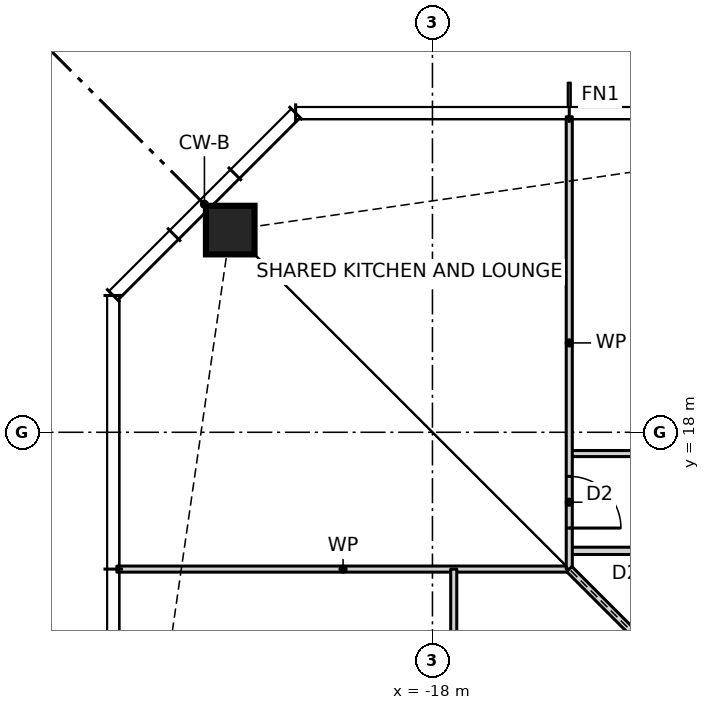
"""IFC4 building model, lengths in metres.
Left out: names, types, materials, properties, quantities, classifications, styles, units other than length and angle.
Written with IfcOpenShell. Run it as: python <this file> out.ifc"""

import sys

from ifc_helpers import new_model, si_unit, direction, frame, frame_2d, origin, origin_2d, place, context, subcontext, project, spatial, rectangle, hollow_rectangle, extrude, element, fill, save


model = new_model("IFC4")
c1 = context("Model", 3, precision=1e-05, world=origin(), true_north=direction((0.0, 1.0)))
c2 = subcontext(c1, "Body", "Model", "MODEL_VIEW")
j1 = project(units=[si_unit("LENGTHUNIT", "METRE"), si_unit("PLANEANGLEUNIT", "RADIAN")], contexts=[c1])
p1 = place(None, origin())
s1 = spatial("IfcSite", under=j1, at=p1, CompositionType="ELEMENT")
p2 = place(p1, origin())
s2 = spatial("IfcBuilding", under=s1, at=p2, CompositionType="ELEMENT")
p3 = place(p2, frame((0.0, 0.0, 18.5)))
s3 = spatial("IfcBuildingStorey", under=s2, at=p3, CompositionType="ELEMENT", Elevation=18.5)
p4 = place(p3, frame((-21.326, 21.326, 0.0), z_axis=(0.0, 0.0, 1.0), x_axis=(1.0, 0.0, 0.0)))
e1 = element("IfcColumn", 1, at=p4, inside=s3, PredefinedType="COLUMN", context=c2, shape_type="SweptSolid", body=[
    extrude(hollow_rectangle(XDim=0.8, YDim=0.8, WallThickness=0.09, at=origin_2d()), origin(), (0.0, 0.0, 1.0), 3.5),
])
p5 = place(p3, frame((-23.19, 15.75, 0.0), z_axis=(0.0, 0.0, 1.0), x_axis=(1.0, 0.0, 0.0)))
e2 = element("IfcWall", 2, at=p5, inside=s3, PredefinedType="PARTITIONING", context=c2, shape_type="SweptSolid", body=[
    extrude(rectangle(XDim=7.44, YDim=0.1, at=frame_2d((3.72, 0.0))), origin(), (0.0, 0.0, 1.0), 3.27),
])
p6 = place(p3, frame((-15.75, 16.05, 0.0), z_axis=(0.0, 0.0, 1.0), x_axis=(1.0, 0.0, 0.0)))
e3 = element("IfcWall", 3, at=p6, inside=s3, PredefinedType="PARTITIONING", context=c2, shape_type="SweptSolid", body=[
    extrude(rectangle(XDim=5.1, YDim=0.12, at=frame_2d((2.55, 0.0))), origin(), (0.0, 0.0, 1.0), 3.27),
])
p7 = place(p6, frame((1.375, 0.0, 0.0)))
e4 = element("IfcOpeningElement", 4, at=p7, cuts=e3, PredefinedType="OPENING", context=c2, shape_type="SweptSolid", body=[
    extrude(rectangle(XDim=0.85, YDim=2.1, at=frame_2d((0.425, 1.05))), frame((0.0, 0.07, 0.0), z_axis=(0.0, -1.0, 0.0), x_axis=(1.0, 0.0, 0.0)), (0.0, 0.0, 1.0), 0.14),
])
p8 = place(p3, frame((-15.75, 17.65, 0.0), z_axis=(0.0, 0.0, 1.0), x_axis=(1.0, 0.0, 0.0)))
e5 = element("IfcWall", 5, at=p8, inside=s3, PredefinedType="PARTITIONING", context=c2, shape_type="SweptSolid", body=[
    extrude(rectangle(XDim=31.5, YDim=0.1, at=frame_2d((15.75, 0.0))), origin(), (0.0, 0.0, 1.0), 3.27),
])
p9 = place(p8, frame((28.8, 0.0, 0.0)))
e6 = element("IfcOpeningElement", 6, at=p9, cuts=e5, PredefinedType="OPENING", context=c2, shape_type="SweptSolid", body=[
    extrude(rectangle(XDim=0.9, YDim=2.1, at=frame_2d((0.45, 1.05))), frame((0.0, 0.06, 0.0), z_axis=(0.0, -1.0, 0.0), x_axis=(1.0, 0.0, 0.0)), (0.0, 0.0, 1.0), 0.12),
])
p10 = place(p8, frame((24.3, 0.0, 0.0)))
e7 = element("IfcOpeningElement", 7, at=p10, cuts=e5, PredefinedType="OPENING", context=c2, shape_type="SweptSolid", body=[
    extrude(rectangle(XDim=0.9, YDim=2.1, at=frame_2d((0.45, 1.05))), frame((0.0, 0.06, 0.0), z_axis=(0.0, -1.0, 0.0), x_axis=(1.0, 0.0, 0.0)), (0.0, 0.0, 1.0), 0.12),
])
p11 = place(p8, frame((19.8, 0.0, 0.0)))
e8 = element("IfcOpeningElement", 8, at=p11, cuts=e5, PredefinedType="OPENING", context=c2, shape_type="SweptSolid", body=[
    extrude(rectangle(XDim=0.9, YDim=2.1, at=frame_2d((0.45, 1.05))), frame((0.0, 0.06, 0.0), z_axis=(0.0, -1.0, 0.0), x_axis=(1.0, 0.0, 0.0)), (0.0, 0.0, 1.0), 0.12),
])
p12 = place(p8, frame((15.3, 0.0, 0.0)))
e9 = element("IfcOpeningElement", 9, at=p12, cuts=e5, PredefinedType="OPENING", context=c2, shape_type="SweptSolid", body=[
    extrude(rectangle(XDim=0.9, YDim=2.1, at=frame_2d((0.45, 1.05))), frame((0.0, 0.06, 0.0), z_axis=(0.0, -1.0, 0.0), x_axis=(1.0, 0.0, 0.0)), (0.0, 0.0, 1.0), 0.12),
])
p13 = place(p8, frame((10.8, 0.0, 0.0)))
e10 = element("IfcOpeningElement", 10, at=p13, cuts=e5, PredefinedType="OPENING", context=c2, shape_type="SweptSolid", body=[
    extrude(rectangle(XDim=0.9, YDim=2.1, at=frame_2d((0.45, 1.05))), frame((0.0, 0.06, 0.0), z_axis=(0.0, -1.0, 0.0), x_axis=(1.0, 0.0, 0.0)), (0.0, 0.0, 1.0), 0.12),
])
p14 = place(p8, frame((6.3, 0.0, 0.0)))
e11 = element("IfcOpeningElement", 11, at=p14, cuts=e5, PredefinedType="OPENING", context=c2, shape_type="SweptSolid", body=[
    extrude(rectangle(XDim=0.9, YDim=2.1, at=frame_2d((0.45, 1.05))), frame((0.0, 0.06, 0.0), z_axis=(0.0, -1.0, 0.0), x_axis=(1.0, 0.0, 0.0)), (0.0, 0.0, 1.0), 0.12),
])
p15 = place(p8, frame((1.8, 0.0, 0.0)))
e12 = element("IfcOpeningElement", 12, at=p15, cuts=e5, PredefinedType="OPENING", context=c2, shape_type="SweptSolid", body=[
    extrude(rectangle(XDim=0.9, YDim=2.1, at=frame_2d((0.45, 1.05))), frame((0.0, 0.06, 0.0), z_axis=(0.0, -1.0, 0.0), x_axis=(1.0, 0.0, 0.0)), (0.0, 0.0, 1.0), 0.12),
])
p16 = place(p3, frame((-15.75, 15.75, 0.0), z_axis=(0.0, 0.0, 1.0), x_axis=(0.0, 1.0, 0.0)))
e13 = element("IfcWall", 13, at=p16, inside=s3, PredefinedType="PARTITIONING", context=c2, shape_type="SweptSolid", body=[
    extrude(rectangle(XDim=7.44, YDim=0.1, at=frame_2d((3.72, 0.0))), origin(), (0.0, 0.0, 1.0), 3.27),
])
p17 = place(p16, frame((0.675, 0.0, 0.0)))
e14 = element("IfcOpeningElement", 14, at=p17, cuts=e13, PredefinedType="OPENING", context=c2, shape_type="SweptSolid", body=[
    extrude(rectangle(XDim=0.85, YDim=2.1, at=frame_2d((0.425, 1.05))), frame((0.0, 0.06, 0.0), z_axis=(0.0, -1.0, 0.0), x_axis=(1.0, 0.0, 0.0)), (0.0, 0.0, 1.0), 0.12),
])
p18 = place(p3, frame((-17.65, -15.75, 0.0), z_axis=(0.0, 0.0, 1.0), x_axis=(0.0, 1.0, 0.0)))
e15 = element("IfcWall", 15, at=p18, inside=s3, PredefinedType="PARTITIONING", context=c2, shape_type="SweptSolid", body=[
    extrude(rectangle(XDim=31.5, YDim=0.1, at=frame_2d((15.75, 0.0))), origin(), (0.0, 0.0, 1.0), 3.27),
])
p19 = place(p18, frame((28.8, 0.0, 0.0)))
e16 = element("IfcOpeningElement", 16, at=p19, cuts=e15, PredefinedType="OPENING", context=c2, shape_type="SweptSolid", body=[
    extrude(rectangle(XDim=0.9, YDim=2.1, at=frame_2d((0.45, 1.05))), frame((0.0, 0.06, 0.0), z_axis=(0.0, -1.0, 0.0), x_axis=(1.0, 0.0, 0.0)), (0.0, 0.0, 1.0), 0.12),
])
p20 = place(p18, frame((24.3, 0.0, 0.0)))
e17 = element("IfcOpeningElement", 17, at=p20, cuts=e15, PredefinedType="OPENING", context=c2, shape_type="SweptSolid", body=[
    extrude(rectangle(XDim=0.9, YDim=2.1, at=frame_2d((0.45, 1.05))), frame((0.0, 0.06, 0.0), z_axis=(0.0, -1.0, 0.0), x_axis=(1.0, 0.0, 0.0)), (0.0, 0.0, 1.0), 0.12),
])
p21 = place(p18, frame((19.8, 0.0, 0.0)))
e18 = element("IfcOpeningElement", 18, at=p21, cuts=e15, PredefinedType="OPENING", context=c2, shape_type="SweptSolid", body=[
    extrude(rectangle(XDim=0.9, YDim=2.1, at=frame_2d((0.45, 1.05))), frame((0.0, 0.06, 0.0), z_axis=(0.0, -1.0, 0.0), x_axis=(1.0, 0.0, 0.0)), (0.0, 0.0, 1.0), 0.12),
])
p22 = place(p18, frame((15.3, 0.0, 0.0)))
e19 = element("IfcOpeningElement", 19, at=p22, cuts=e15, PredefinedType="OPENING", context=c2, shape_type="SweptSolid", body=[
    extrude(rectangle(XDim=0.9, YDim=2.1, at=frame_2d((0.45, 1.05))), frame((0.0, 0.06, 0.0), z_axis=(0.0, -1.0, 0.0), x_axis=(1.0, 0.0, 0.0)), (0.0, 0.0, 1.0), 0.12),
])
p23 = place(p18, frame((10.8, 0.0, 0.0)))
e20 = element("IfcOpeningElement", 20, at=p23, cuts=e15, PredefinedType="OPENING", context=c2, shape_type="SweptSolid", body=[
    extrude(rectangle(XDim=0.9, YDim=2.1, at=frame_2d((0.45, 1.05))), frame((0.0, 0.06, 0.0), z_axis=(0.0, -1.0, 0.0), x_axis=(1.0, 0.0, 0.0)), (0.0, 0.0, 1.0), 0.12),
])
p24 = place(p18, frame((6.3, 0.0, 0.0)))
e21 = element("IfcOpeningElement", 21, at=p24, cuts=e15, PredefinedType="OPENING", context=c2, shape_type="SweptSolid", body=[
    extrude(rectangle(XDim=0.9, YDim=2.1, at=frame_2d((0.45, 1.05))), frame((0.0, 0.06, 0.0), z_axis=(0.0, -1.0, 0.0), x_axis=(1.0, 0.0, 0.0)), (0.0, 0.0, 1.0), 0.12),
])
p25 = place(p18, frame((1.8, 0.0, 0.0)))
e22 = element("IfcOpeningElement", 22, at=p25, cuts=e15, PredefinedType="OPENING", context=c2, shape_type="SweptSolid", body=[
    extrude(rectangle(XDim=0.9, YDim=2.1, at=frame_2d((0.45, 1.05))), frame((0.0, 0.06, 0.0), z_axis=(0.0, -1.0, 0.0), x_axis=(1.0, 0.0, 0.0)), (0.0, 0.0, 1.0), 0.12),
])
p26 = place(p3, frame((-11.6, 11.6, 0.0), z_axis=(0.0, 0.0, 1.0), x_axis=(-0.707106781187, 0.707106781187, 0.0)))
e23 = element("IfcWall", 23, at=p26, inside=s3, PredefinedType="PARTITIONING", context=c2, shape_type="SweptSolid", body=[
    extrude(rectangle(XDim=5.869, YDim=0.12, at=frame_2d((2.935, 0.0))), origin(), (0.0, 0.0, 1.0), 2.343),
])
p27 = place(p17, frame((0.85, 0.0, 0.0), z_axis=(0.0, 0.0, 1.0), x_axis=(-1.0, 0.0, 0.0)))
e24 = element("IfcDoor", 24, at=p27, inside=s3, OperationType="SINGLE_SWING_RIGHT", PredefinedType="DOOR", context=c2, shape_type="SweptSolid", body=[
    extrude(rectangle(XDim=0.85, YDim=2.1, at=frame_2d((0.425, 1.05))), frame((0.0, 0.025, 0.0), z_axis=(0.0, -1.0, 0.0), x_axis=(1.0, 0.0, 0.0)), (0.0, 0.0, 1.0), 0.05),
])
fill(e14, e24)
save(model, sys.argv[1])
